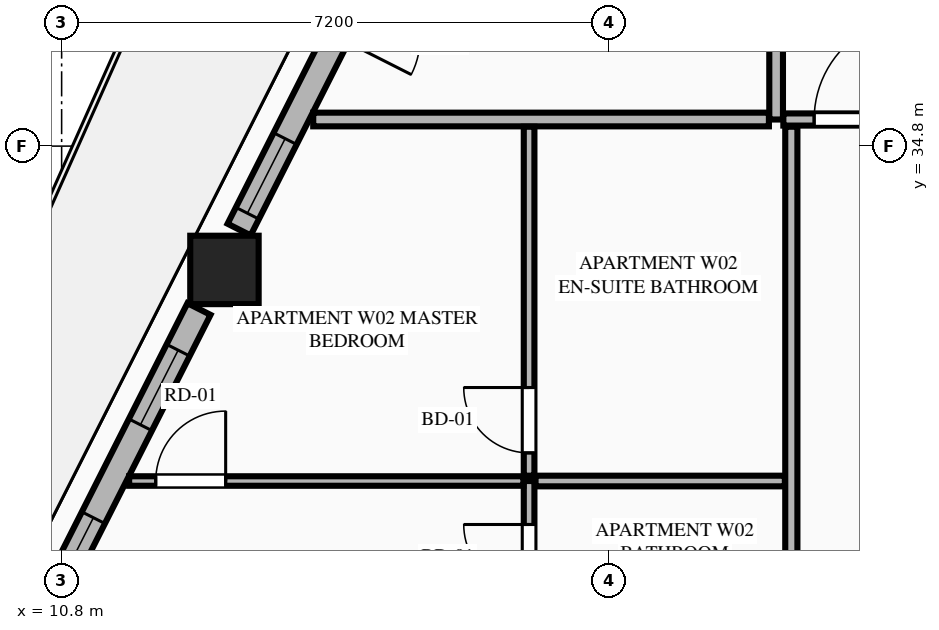
"""IFC4 building model, lengths in metres.
Left out: names, types, materials, properties, quantities, classifications, styles, units other than length and angle.
Written with IfcOpenShell. Run it as: python <this file> out.ifc"""

import sys

from ifc_helpers import new_model, si_unit, direction, frame, frame_2d, origin, origin_2d, place, context, subcontext, project, spatial, rectangle, extrude, element, fill, save


model = new_model("IFC4")
c1 = context("Model", 3, precision=1e-05, world=origin(), true_north=direction((0.0, 1.0)))
c2 = subcontext(c1, "Body", "Model", "MODEL_VIEW")
j1 = project(units=[si_unit("LENGTHUNIT", "METRE"), si_unit("PLANEANGLEUNIT", "RADIAN")], contexts=[c1])
p1 = place(None, origin())
s1 = spatial("IfcSite", under=j1, at=p1, CompositionType="ELEMENT")
p2 = place(p1, origin())
s2 = spatial("IfcBuilding", under=s1, at=p2, CompositionType="ELEMENT")
p3 = place(p2, frame((0.0, 0.0, 189.65)))
s3 = spatial("IfcBuildingStorey", under=s2, at=p3, CompositionType="ELEMENT", Elevation=189.65)
p4 = place(p3, frame((12.942, 33.171, 0.0), z_axis=(0.0, 0.0, 1.0), x_axis=(1.0, 0.0, 0.0)))
e1 = element("IfcColumn", 1, at=p4, inside=s3, PredefinedType="COLUMN", context=c2, shape_type="SweptSolid", body=[
    extrude(rectangle(XDim=0.9, YDim=0.9, at=origin_2d()), origin(), (0.0, 0.0, 1.0), 3.55),
])
p5 = place(p3, frame((15.352, 38.083, 0.0), z_axis=(0.0, 0.0, 1.0), x_axis=(-0.451524246964, -0.89225884944, 0.0)))
e2 = element("IfcWall", 2, at=p5, inside=s3, PredefinedType="STANDARD", context=c2, shape_type="SweptSolid", body=[
    extrude(rectangle(XDim=4.91, YDim=0.34, at=frame_2d((2.455, 0.0))), origin(), (0.0, 0.0, 1.0), 2.883),
])
p6 = place(p5, frame((0.968, 0.0, 0.0)))
e3 = element("IfcOpeningElement", 3, at=p6, cuts=e2, PredefinedType="OPENING", context=c2, shape_type="SweptSolid", body=[
    extrude(rectangle(XDim=1.1, YDim=2.25, at=frame_2d((0.55, 1.125))), frame((0.0, 0.18, 0.0), z_axis=(0.0, -1.0, 0.0), x_axis=(1.0, 0.0, 0.0)), (0.0, 0.0, 1.0), 0.36),
])
p7 = place(p5, frame((3.569, 0.0, 0.75)))
e4 = element("IfcOpeningElement", 4, at=p7, cuts=e2, PredefinedType="OPENING", context=c2, shape_type="SweptSolid", body=[
    extrude(rectangle(XDim=1.1, YDim=1.983, at=frame_2d((0.55, 0.991))), frame((0.0, 0.18, 0.0), z_axis=(0.0, -1.0, 0.0), x_axis=(1.0, 0.0, 0.0)), (0.0, 0.0, 1.0), 0.36),
])
p8 = place(p3, frame((12.607, 32.657, 0.0), z_axis=(0.0, 0.0, 1.0), x_axis=(-0.451426298588, -0.892308409096, 0.0)))
e5 = element("IfcWall", 5, at=p8, inside=s3, PredefinedType="STANDARD", context=c2, shape_type="SweptSolid", body=[
    extrude(rectangle(XDim=4.7, YDim=0.34, at=frame_2d((2.35, 0.0))), origin(), (0.0, 0.0, 1.0), 2.883),
])
p9 = place(p8, frame((0.607, 0.0, 0.75)))
e6 = element("IfcOpeningElement", 6, at=p9, cuts=e5, PredefinedType="OPENING", context=c2, shape_type="SweptSolid", body=[
    extrude(rectangle(XDim=1.1, YDim=1.983, at=frame_2d((0.55, 0.991))), frame((0.0, 0.18, 0.0), z_axis=(0.0, -1.0, 0.0), x_axis=(1.0, 0.0, 0.0)), (0.0, 0.0, 1.0), 0.36),
])
p10 = place(p8, frame((3.077, 0.0, 0.75)))
e7 = element("IfcOpeningElement", 7, at=p10, cuts=e5, PredefinedType="OPENING", context=c2, shape_type="SweptSolid", body=[
    extrude(rectangle(XDim=1.1, YDim=1.983, at=frame_2d((0.55, 0.991))), frame((0.0, 0.18, 0.0), z_axis=(0.0, -1.0, 0.0), x_axis=(1.0, 0.0, 0.0)), (0.0, 0.0, 1.0), 0.36),
])
p11 = place(p3, frame((20.2, 35.15, 0.0), z_axis=(0.0, 0.0, 1.0), x_axis=(0.0, 1.0, 0.0)))
e8 = element("IfcWall", 8, at=p11, inside=s3, PredefinedType="PARTITIONING", context=c2, shape_type="SweptSolid", body=[
    extrude(rectangle(XDim=10.482, YDim=0.18, at=frame_2d((5.241, 0.0))), origin(), (0.0, 0.0, 1.0), 3.35),
])
p12 = place(p3, frame((20.295, 35.15, 0.0), z_axis=(0.0, 0.0, 1.0), x_axis=(1.0, 0.0, 0.0)))
e9 = element("IfcWall", 9, at=p12, inside=s3, PredefinedType="PARTITIONING", context=c2, shape_type="SweptSolid", body=[
    extrude(rectangle(XDim=24.21, YDim=0.16, at=frame_2d((12.105, 0.0))), origin(), (0.0, 0.0, 1.0), 3.35),
])
p13 = place(p12, frame((0.405, 0.0, 0.0)))
e10 = element("IfcOpeningElement", 10, at=p13, cuts=e9, PredefinedType="OPENING", context=c2, shape_type="SweptSolid", body=[
    extrude(rectangle(XDim=1.35, YDim=2.35, at=frame_2d((0.675, 1.175))), frame((0.0, 0.09, 0.0), z_axis=(0.0, -1.0, 0.0), x_axis=(1.0, 0.0, 0.0)), (0.0, 0.0, 1.0), 0.18),
])
p14 = place(p3, frame((14.11, 35.15, 0.0), z_axis=(0.0, 0.0, 1.0), x_axis=(1.0, 0.0, 0.0)))
e11 = element("IfcWall", 11, at=p14, inside=s3, PredefinedType="PARTITIONING", context=c2, shape_type="SweptSolid", body=[
    extrude(rectangle(XDim=5.995, YDim=0.18, at=frame_2d((2.998, 0.0))), origin(), (0.0, 0.0, 1.0), 3.35),
])
p15 = place(p3, frame((20.4, 25.039, 0.0), z_axis=(0.0, 0.0, 1.0), x_axis=(0.0, 1.0, 0.0)))
e12 = element("IfcWall", 12, at=p15, inside=s3, PredefinedType="PARTITIONING", context=c2, shape_type="SweptSolid", body=[
    extrude(rectangle(XDim=10.016, YDim=0.16, at=frame_2d((5.008, 0.0))), origin(), (0.0, 0.0, 1.0), 3.35),
])
p16 = place(p15, frame((0.45, 0.0, 0.0)))
e13 = element("IfcOpeningElement", 13, at=p16, cuts=e12, PredefinedType="OPENING", context=c2, shape_type="SweptSolid", body=[
    extrude(rectangle(XDim=1.02, YDim=2.25, at=frame_2d((0.51, 1.125))), frame((0.0, 0.09, 0.0), z_axis=(0.0, -1.0, 0.0), x_axis=(1.0, 0.0, 0.0)), (0.0, 0.0, 1.0), 0.18),
])
p17 = place(p3, frame((16.95, 26.994, 0.0), z_axis=(0.0, 0.0, 1.0), x_axis=(0.0, 1.0, 0.0)))
e14 = element("IfcWall", 14, at=p17, inside=s3, PredefinedType="PLUMBINGWALL", context=c2, shape_type="SweptSolid", body=[
    extrude(rectangle(XDim=3.4, YDim=0.14, at=frame_2d((1.7, 0.0))), origin(), (0.0, 0.0, 1.0), 3.35),
])
p18 = place(p17, frame((0.2, 0.0, 0.0)))
e15 = element("IfcOpeningElement", 15, at=p18, cuts=e14, PredefinedType="OPENING", context=c2, shape_type="SweptSolid", body=[
    extrude(rectangle(XDim=0.88, YDim=2.15, at=frame_2d((0.44, 1.075))), frame((0.0, 0.08, 0.0), z_axis=(0.0, -1.0, 0.0), x_axis=(1.0, 0.0, 0.0)), (0.0, 0.0, 1.0), 0.16),
])
p19 = place(p17, frame((1.968, 0.0, 0.0)))
e16 = element("IfcOpeningElement", 16, at=p19, cuts=e14, PredefinedType="OPENING", context=c2, shape_type="SweptSolid", body=[
    extrude(rectangle(XDim=0.86, YDim=2.1, at=frame_2d((0.43, 1.05))), frame((0.0, 0.08, 0.0), z_axis=(0.0, -1.0, 0.0), x_axis=(1.0, 0.0, 0.0)), (0.0, 0.0, 1.0), 0.16),
])
p20 = place(p3, frame((16.95, 30.464, 0.0), z_axis=(0.0, 0.0, 1.0), x_axis=(0.0, 1.0, 0.0)))
e17 = element("IfcWall", 17, at=p20, inside=s3, PredefinedType="PLUMBINGWALL", context=c2, shape_type="SweptSolid", body=[
    extrude(rectangle(XDim=4.591, YDim=0.14, at=frame_2d((2.295, 0.0))), origin(), (0.0, 0.0, 1.0), 3.35),
])
p21 = place(p20, frame((0.3, 0.0, 0.0)))
e18 = element("IfcOpeningElement", 18, at=p21, cuts=e17, PredefinedType="OPENING", context=c2, shape_type="SweptSolid", body=[
    extrude(rectangle(XDim=0.86, YDim=2.1, at=frame_2d((0.43, 1.05))), frame((0.0, 0.08, 0.0), z_axis=(0.0, -1.0, 0.0), x_axis=(1.0, 0.0, 0.0)), (0.0, 0.0, 1.0), 0.16),
])
p22 = place(p3, frame((17.035, 30.394, 0.0), z_axis=(0.0, 0.0, 1.0), x_axis=(1.0, 0.0, 0.0)))
e19 = element("IfcWall", 19, at=p22, inside=s3, PredefinedType="PLUMBINGWALL", context=c2, shape_type="SweptSolid", body=[
    extrude(rectangle(XDim=3.28, YDim=0.14, at=frame_2d((1.64, 0.0))), origin(), (0.0, 0.0, 1.0), 3.35),
])
p23 = place(p3, frame((11.688, 30.394, 0.0), z_axis=(0.0, 0.0, 1.0), x_axis=(1.0, 0.0, 0.0)))
e20 = element("IfcWall", 20, at=p23, inside=s3, PredefinedType="PARTITIONING", context=c2, shape_type="SweptSolid", body=[
    extrude(rectangle(XDim=5.187, YDim=0.125, at=frame_2d((2.594, 0.0))), origin(), (0.0, 0.0, 1.0), 3.35),
])
p24 = place(p23, frame((0.35, 0.0, 0.0)))
e21 = element("IfcOpeningElement", 21, at=p24, cuts=e20, PredefinedType="OPENING", context=c2, shape_type="SweptSolid", body=[
    extrude(rectangle(XDim=0.92, YDim=2.15, at=frame_2d((0.46, 1.075))), frame((0.0, 0.073, 0.0), z_axis=(0.0, -1.0, 0.0), x_axis=(1.0, 0.0, 0.0)), (0.0, 0.0, 1.0), 0.145),
])
p25 = place(p9, origin())
e22 = element("IfcWindow", 22, at=p25, inside=s3, PartitioningType="SINGLE_PANEL", PredefinedType="WINDOW", context=c2, shape_type="SweptSolid", body=[
    extrude(rectangle(XDim=1.1, YDim=1.983, at=frame_2d((0.55, 0.991))), frame((0.0, 0.03, 0.0), z_axis=(0.0, -1.0, 0.0), x_axis=(1.0, 0.0, 0.0)), (0.0, 0.0, 1.0), 0.06),
])
fill(e6, e22)
p26 = place(p13, origin())
e23 = element("IfcDoor", 23, at=p26, inside=s3, OperationType="SINGLE_SWING_RIGHT", PredefinedType="DOOR", context=c2, shape_type="SweptSolid", body=[
    extrude(rectangle(XDim=1.35, YDim=2.35, at=frame_2d((0.675, 1.175))), frame((0.0, 0.025, 0.0), z_axis=(0.0, -1.0, 0.0), x_axis=(1.0, 0.0, 0.0)), (0.0, 0.0, 1.0), 0.05),
])
fill(e10, e23)
p27 = place(p19, origin())
e24 = element("IfcDoor", 24, at=p27, inside=s3, OperationType="SINGLE_SWING_RIGHT", PredefinedType="DOOR", context=c2, shape_type="SweptSolid", body=[
    extrude(rectangle(XDim=0.86, YDim=2.1, at=frame_2d((0.43, 1.05))), frame((0.0, 0.025, 0.0), z_axis=(0.0, -1.0, 0.0), x_axis=(1.0, 0.0, 0.0)), (0.0, 0.0, 1.0), 0.05),
])
fill(e16, e24)
p28 = place(p21, origin())
e25 = element("IfcDoor", 25, at=p28, inside=s3, OperationType="SINGLE_SWING_RIGHT", PredefinedType="DOOR", context=c2, shape_type="SweptSolid", body=[
    extrude(rectangle(XDim=0.86, YDim=2.1, at=frame_2d((0.43, 1.05))), frame((0.0, 0.025, 0.0), z_axis=(0.0, -1.0, 0.0), x_axis=(1.0, 0.0, 0.0)), (0.0, 0.0, 1.0), 0.05),
])
fill(e18, e25)
p29 = place(p24, origin())
e26 = element("IfcDoor", 26, at=p29, inside=s3, OperationType="SINGLE_SWING_RIGHT", PredefinedType="DOOR", context=c2, shape_type="SweptSolid", body=[
    extrude(rectangle(XDim=0.92, YDim=2.15, at=frame_2d((0.46, 1.075))), frame((0.0, 0.025, 0.0), z_axis=(0.0, -1.0, 0.0), x_axis=(1.0, 0.0, 0.0)), (0.0, 0.0, 1.0), 0.05),
])
fill(e21, e26)
p30 = place(p7, origin())
e27 = element("IfcWindow", 27, at=p30, inside=s3, PartitioningType="SINGLE_PANEL", PredefinedType="WINDOW", context=c2, shape_type="SweptSolid", body=[
    extrude(rectangle(XDim=1.1, YDim=1.983, at=frame_2d((0.55, 0.991))), frame((0.0, 0.03, 0.0), z_axis=(0.0, -1.0, 0.0), x_axis=(1.0, 0.0, 0.0)), (0.0, 0.0, 1.0), 0.06),
])
fill(e4, e27)
p31 = place(p10, origin())
e28 = element("IfcWindow", 28, at=p31, inside=s3, PartitioningType="SINGLE_PANEL", PredefinedType="WINDOW", context=c2, shape_type="SweptSolid", body=[
    extrude(rectangle(XDim=1.1, YDim=1.983, at=frame_2d((0.55, 0.991))), frame((0.0, 0.03, 0.0), z_axis=(0.0, -1.0, 0.0), x_axis=(1.0, 0.0, 0.0)), (0.0, 0.0, 1.0), 0.06),
])
fill(e7, e28)
save(model, sys.argv[1])
